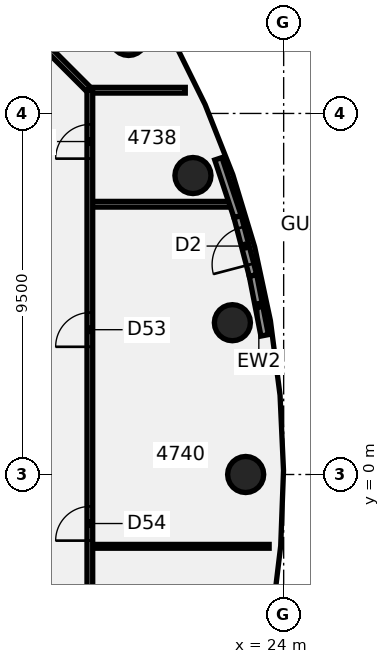
"""IFC4 building model, lengths in metres.
Left out: names, types, materials, properties, quantities, classifications, styles, units other than length and angle.
Written with IfcOpenShell. Run it as: python <this file> out.ifc"""

import sys

from ifc_helpers import new_model, si_unit, direction, frame, frame_2d, origin, origin_2d, place, context, subcontext, project, spatial, rectangle, circle, extrude, element, fill, save


model = new_model("IFC4")
c1 = context("Model", 3, precision=1e-05, world=origin(), true_north=direction((0.0, 1.0)))
c2 = subcontext(c1, "Body", "Model", "MODEL_VIEW")
j1 = project(units=[si_unit("LENGTHUNIT", "METRE"), si_unit("PLANEANGLEUNIT", "RADIAN")], contexts=[c1])
p1 = place(None, origin())
s1 = spatial("IfcSite", under=j1, at=p1, CompositionType="ELEMENT")
p2 = place(p1, origin())
s2 = spatial("IfcBuilding", under=s1, at=p2, CompositionType="ELEMENT")
p3 = place(p2, frame((0.0, 0.0, 189.7)))
s3 = spatial("IfcBuildingStorey", under=s2, at=p3, CompositionType="ELEMENT", Elevation=189.7)
for number, where, z_axis, x_axis in (
    (1, (23.0, 0.0, -0.14), (0.0, 0.0, 1.0), (1.0, 0.0, 0.0)),
    (2, (22.651, 3.994, -0.14), (0.0, 0.0, 1.0), (1.0, 0.0, 0.0)),
    (3, (21.613, 7.866, -0.14), (0.0, 0.0, 1.0), (1.0, 0.0, 0.0)),
    (4, (19.919, 11.5, -0.14), (0.0, 0.0, 1.0), (1.0, 0.0, 0.0)),
):
    element("IfcColumn", number, at=place(p3, frame(where, z_axis=z_axis, x_axis=x_axis)), inside=s3, PredefinedType="COLUMN", context=c2, shape_type="SweptSolid", body=[
        extrude(circle(Radius=0.475, at=origin_2d()), origin(), (0.0, 0.0, 1.0), 3.6),
    ])
p4 = place(p3, frame((17.128, 11.872, 0.0), z_axis=(0.0, 0.0, 1.0), x_axis=(0.707106781187, -0.707106781187, 0.0)))
e5 = element("IfcWall", 5, at=p4, inside=s3, PredefinedType="PARTITIONING", context=c2, shape_type="SweptSolid", body=[
    extrude(rectangle(XDim=2.455, YDim=0.15, at=frame_2d((1.228, 0.0))), origin(), (0.0, 0.0, 1.0), 2.864),
])
p5 = place(p3, frame((18.955, -1.89, 0.0), z_axis=(0.0, 0.0, 1.0), x_axis=(1.0, 0.0, 0.0)))
e6 = element("IfcWall", 6, at=p5, inside=s3, PredefinedType="PARTITIONING", context=c2, shape_type="SweptSolid", body=[
    extrude(rectangle(XDim=4.663, YDim=0.1, at=frame_2d((2.332, 0.0))), origin(), (0.0, 0.0, 1.0), 2.864),
])
p6 = place(p3, frame((18.955, 7.111, 0.0), z_axis=(0.0, 0.0, 1.0), x_axis=(1.0, 0.0, 0.0)))
e7 = element("IfcWall", 7, at=p6, inside=s3, PredefinedType="PARTITIONING", context=c2, shape_type="SweptSolid", body=[
    extrude(rectangle(XDim=3.628, YDim=0.15, at=frame_2d((1.814, 0.0))), origin(), (0.0, 0.0, 1.0), 2.864),
])
p7 = place(p3, frame((18.955, 10.111, 0.0), z_axis=(0.0, 0.0, 1.0), x_axis=(1.0, 0.0, 0.0)))
e8 = element("IfcWall", 8, at=p7, inside=s3, PredefinedType="PARTITIONING", context=c2, shape_type="SweptSolid", body=[
    extrude(rectangle(XDim=2.456, YDim=0.15, at=frame_2d((1.228, 0.0))), origin(), (0.0, 0.0, 1.0), 2.864),
])
p8 = place(p3, frame((18.9, -10.1, 0.0), z_axis=(0.0, 0.0, 1.0), x_axis=(0.0, 1.0, 0.0)))
e9 = element("IfcWall", 9, at=p8, inside=s3, PredefinedType="PARTITIONING", context=c2, shape_type="SweptSolid", body=[
    extrude(rectangle(XDim=20.211, YDim=0.15, at=frame_2d((10.105, 0.0))), origin(), (0.0, 0.0, 1.0), 2.864),
])
p9 = place(p8, frame((18.411, 0.0, 0.0)))
e10 = element("IfcOpeningElement", 10, at=p9, cuts=e9, PredefinedType="OPENING", context=c2, shape_type="SweptSolid", body=[
    extrude(rectangle(XDim=0.9, YDim=2.1, at=frame_2d((0.45, 1.05))), frame((0.0, 0.085, 0.0), z_axis=(0.0, -1.0, 0.0), x_axis=(1.0, 0.0, 0.0)), (0.0, 0.0, 1.0), 0.17),
])
p10 = place(p8, frame((0.75, 0.0, 0.0)))
e11 = element("IfcOpeningElement", 11, at=p10, cuts=e9, PredefinedType="OPENING", context=c2, shape_type="SweptSolid", body=[
    extrude(rectangle(XDim=1.8, YDim=2.1, at=frame_2d((0.9, 1.05))), frame((0.0, 0.085, 0.0), z_axis=(0.0, -1.0, 0.0), x_axis=(1.0, 0.0, 0.0)), (0.0, 0.0, 1.0), 0.17),
])
p11 = place(p8, frame((13.46, 0.0, 0.0)))
e12 = element("IfcOpeningElement", 12, at=p11, cuts=e9, PredefinedType="OPENING", context=c2, shape_type="SweptSolid", body=[
    extrude(rectangle(XDim=0.9, YDim=2.1, at=frame_2d((0.45, 1.05))), frame((0.0, 0.085, 0.0), z_axis=(0.0, -1.0, 0.0), x_axis=(1.0, 0.0, 0.0)), (0.0, 0.0, 1.0), 0.17),
])
p12 = place(p8, frame((8.36, 0.0, 0.0)))
e13 = element("IfcOpeningElement", 13, at=p12, cuts=e9, PredefinedType="OPENING", context=c2, shape_type="SweptSolid", body=[
    extrude(rectangle(XDim=0.9, YDim=2.1, at=frame_2d((0.45, 1.05))), frame((0.0, 0.085, 0.0), z_axis=(0.0, -1.0, 0.0), x_axis=(1.0, 0.0, 0.0)), (0.0, 0.0, 1.0), 0.17),
])
p13 = place(p3, frame((23.5, 3.662, 0.0), z_axis=(0.0, 0.0, 1.0), x_axis=(-0.191317400728, 0.981528222813, 0.0)))
e14 = element("IfcWall", 14, at=p13, inside=s3, PredefinedType="SOLIDWALL", context=c2, shape_type="SweptSolid", body=[
    extrude(rectangle(XDim=1.605, YDim=0.2, at=frame_2d((0.803, 0.0))), origin(), (0.0, 0.0, 1.0), 3.46),
])
p14 = place(p3, frame((22.787, 6.784, 0.0), z_axis=(0.0, 0.0, 1.0), x_axis=(-0.314950038324, 0.949108251655, 0.0)))
e15 = element("IfcWall", 15, at=p14, inside=s3, PredefinedType="SOLIDWALL", context=c2, shape_type="SweptSolid", body=[
    extrude(rectangle(XDim=1.605, YDim=0.2, at=frame_2d((0.803, 0.0))), origin(), (0.0, 0.0, 1.0), 3.46),
])
p15 = place(p3, frame((23.193, 5.237, 0.0), z_axis=(0.0, 0.0, 1.0), x_axis=(-0.253658813577, 0.96729375388, 0.0)))
e16 = element("IfcWall", 16, at=p15, inside=s3, PredefinedType="SOLIDWALL", context=c2, shape_type="SweptSolid", body=[
    extrude(rectangle(XDim=1.599, YDim=0.2, at=frame_2d((0.799, 0.0))), origin(), (0.0, 0.0, 1.0), 3.46),
])
p16 = place(p15, frame((0.299, 0.0, 0.0)))
e17 = element("IfcOpeningElement", 17, at=p16, cuts=e16, PredefinedType="OPENING", context=c2, shape_type="SweptSolid", body=[
    extrude(rectangle(XDim=1.0, YDim=2.4, at=frame_2d((0.5, 1.2))), frame((0.0, 0.11, 0.0), z_axis=(0.0, -1.0, 0.0), x_axis=(1.0, 0.0, 0.0)), (0.0, 0.0, 1.0), 0.22),
])
p17 = place(p9, frame((0.9, 0.0, 0.0), z_axis=(0.0, 0.0, 1.0), x_axis=(-1.0, 0.0, 0.0)))
e18 = element("IfcDoor", 18, at=p17, inside=s3, OperationType="SINGLE_SWING_RIGHT", PredefinedType="DOOR", context=c2, shape_type="SweptSolid", body=[
    extrude(rectangle(XDim=0.9, YDim=2.1, at=frame_2d((0.45, 1.05))), frame((0.0, 0.025, 0.0), z_axis=(0.0, -1.0, 0.0), x_axis=(1.0, 0.0, 0.0)), (0.0, 0.0, 1.0), 0.05),
])
fill(e10, e18)
p18 = place(p11, frame((0.9, 0.0, 0.0), z_axis=(0.0, 0.0, 1.0), x_axis=(-1.0, 0.0, 0.0)))
e19 = element("IfcDoor", 19, at=p18, inside=s3, OperationType="SINGLE_SWING_RIGHT", PredefinedType="DOOR", context=c2, shape_type="SweptSolid", body=[
    extrude(rectangle(XDim=0.9, YDim=2.1, at=frame_2d((0.45, 1.05))), frame((0.0, 0.025, 0.0), z_axis=(0.0, -1.0, 0.0), x_axis=(1.0, 0.0, 0.0)), (0.0, 0.0, 1.0), 0.05),
])
fill(e12, e19)
p19 = place(p12, frame((0.9, 0.0, 0.0), z_axis=(0.0, 0.0, 1.0), x_axis=(-1.0, 0.0, 0.0)))
e20 = element("IfcDoor", 20, at=p19, inside=s3, OperationType="SINGLE_SWING_LEFT", PredefinedType="DOOR", context=c2, shape_type="SweptSolid", body=[
    extrude(rectangle(XDim=0.9, YDim=2.1, at=frame_2d((0.45, 1.05))), frame((0.0, 0.025, 0.0), z_axis=(0.0, -1.0, 0.0), x_axis=(1.0, 0.0, 0.0)), (0.0, 0.0, 1.0), 0.05),
])
fill(e13, e20)
p20 = place(p16, origin())
e21 = element("IfcDoor", 21, at=p20, inside=s3, OperationType="SINGLE_SWING_LEFT", PredefinedType="DOOR", context=c2, shape_type="SweptSolid", body=[
    extrude(rectangle(XDim=1.0, YDim=2.4, at=frame_2d((0.5, 1.2))), frame((0.0, 0.025, 0.0), z_axis=(0.0, -1.0, 0.0), x_axis=(1.0, 0.0, 0.0)), (0.0, 0.0, 1.0), 0.05),
])
fill(e17, e21)
save(model, sys.argv[1])
